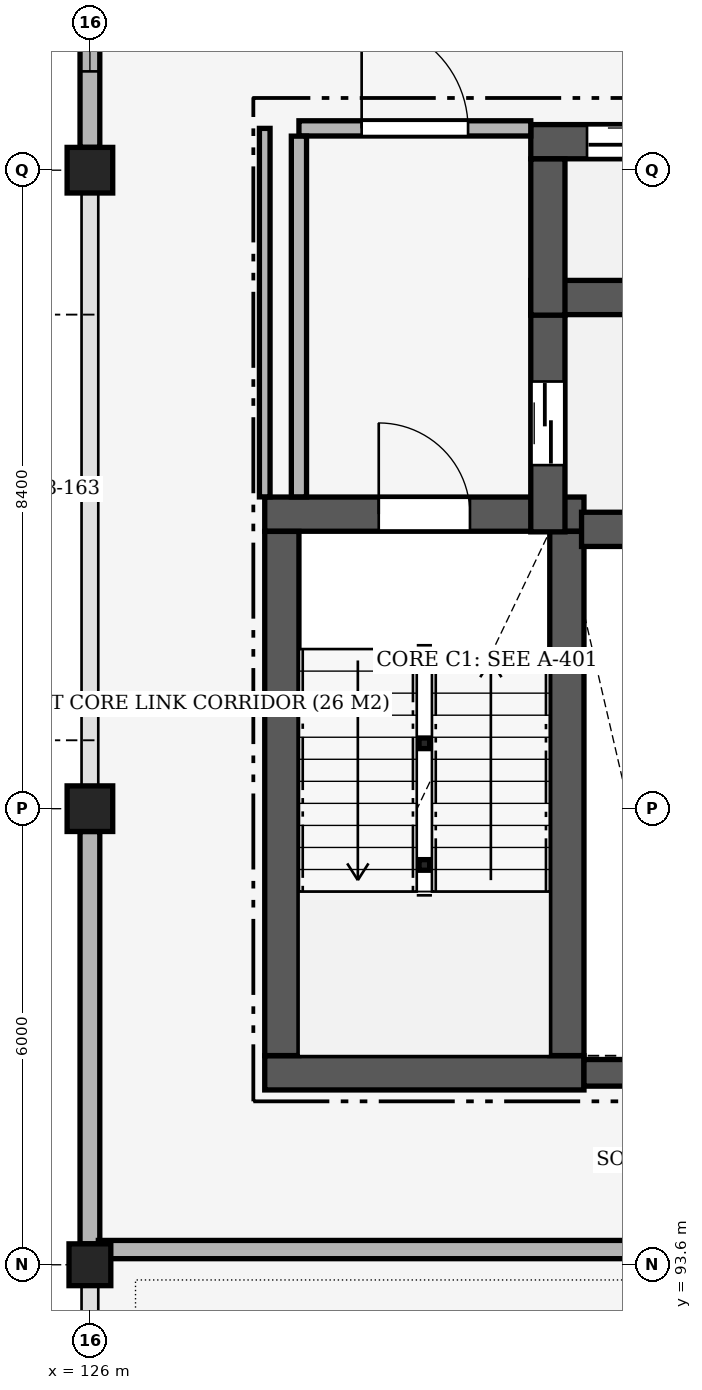
"""IFC4 building model, lengths in metres.
Left out: names, types, materials, properties, quantities, classifications, styles, units other than length and angle.
Written with IfcOpenShell. Run it as: python <this file> out.ifc"""

import sys

from ifc_helpers import new_model, si_unit, direction, frame, frame_2d, origin, origin_2d, place, context, subcontext, project, spatial, rectangle, hollow_circle, extrude, element, fill, save


model = new_model("IFC4")
c1 = context("Model", 3, precision=1e-05, world=origin(), true_north=direction((0.0, 1.0)))
c2 = subcontext(c1, "Body", "Model", "MODEL_VIEW")
j1 = project(units=[si_unit("LENGTHUNIT", "METRE"), si_unit("PLANEANGLEUNIT", "RADIAN")], contexts=[c1])
p1 = place(None, origin())
s1 = spatial("IfcSite", under=j1, at=p1, CompositionType="ELEMENT")
p2 = place(p1, origin())
s2 = spatial("IfcBuilding", under=s1, at=p2, CompositionType="ELEMENT")
p3 = place(p2, frame((0.0, 0.0, 37.8)))
s3 = spatial("IfcBuildingStorey", under=s2, at=p3, CompositionType="ELEMENT", Elevation=37.8)
p4 = place(p3, frame((126.0, 93.6, 0.0), z_axis=(0.0, 0.0, 1.0), x_axis=(1.0, 0.0, 0.0)))
e1 = element("IfcColumn", 1, at=p4, inside=s3, PredefinedType="COLUMN", context=c2, shape_type="SweptSolid", body=[
    extrude(rectangle(XDim=0.55, YDim=0.55, at=origin_2d()), origin(), (0.0, 0.0, 1.0), 4.2),
])
for number, where, z_axis, x_axis in (
    (2, (126.0, 99.6, 0.0), (0.0, 0.0, 1.0), (1.0, 0.0, 0.0)),
    (3, (126.0, 108.0, 0.0), (0.0, 0.0, 1.0), (1.0, 0.0, 0.0)),
):
    element("IfcColumn", number, at=place(p3, frame(where, z_axis=z_axis, x_axis=x_axis)), inside=s3, PredefinedType="COLUMN", context=c2, shape_type="SweptSolid", body=[
        extrude(rectangle(XDim=0.6, YDim=0.6, at=origin_2d()), origin(), (0.0, 0.0, 1.0), 4.2),
    ])
for number, where, z_axis, x_axis in (
    (4, (130.4, 98.86, -2.53), (0.0, 0.0, 1.0), (1.0, 0.0, 0.0)),
    (5, (130.4, 100.46, -2.53), (0.0, 0.0, 1.0), (1.0, 0.0, 0.0)),
):
    element("IfcColumn", number, at=place(p3, frame(where, z_axis=z_axis, x_axis=x_axis)), inside=s3, PredefinedType="COLUMN", context=c2, shape_type="SweptSolid", body=[
        extrude(hollow_circle(Radius=0.07, WallThickness=0.008, at=origin_2d()), origin(), (0.0, 0.0, 1.0), 4.2),
    ])
p5 = place(p3, frame((126.0, 93.875, 0.0), z_axis=(0.0, 0.0, 1.0), x_axis=(0.0, 1.0, 0.0)))
e6 = element("IfcWall", 6, at=p5, inside=s3, PredefinedType="SOLIDWALL", context=c2, shape_type="SweptSolid", body=[
    extrude(rectangle(XDim=5.425, YDim=0.26, at=frame_2d((2.712, 0.0))), origin(), (0.0, 0.0, 1.0), 3.41),
])
p6 = place(p3, frame((126.0, 108.3, 0.0), z_axis=(0.0, 0.0, 1.0), x_axis=(0.0, 1.0, 0.0)))
e7 = element("IfcWall", 7, at=p6, inside=s3, PredefinedType="SOLIDWALL", context=c2, shape_type="SweptSolid", body=[
    extrude(rectangle(XDim=4.8, YDim=0.26, at=frame_2d((2.4, 0.0))), origin(), (0.0, 0.0, 1.0), 3.41),
])
p7 = place(p6, frame((1.0, 0.0, 0.9)))
e8 = element("IfcOpeningElement", 8, at=p7, cuts=e7, PredefinedType="OPENING", context=c2, shape_type="SweptSolid", body=[
    extrude(rectangle(XDim=0.9, YDim=2.2, at=frame_2d((0.45, 1.1))), frame((0.0, 0.145, 0.0), z_axis=(0.0, -1.0, 0.0), x_axis=(1.0, 0.0, 0.0)), (0.0, 0.0, 1.0), 0.29),
])
p8 = place(p6, frame((2.9, 0.0, 0.9)))
e9 = element("IfcOpeningElement", 9, at=p8, cuts=e7, PredefinedType="OPENING", context=c2, shape_type="SweptSolid", body=[
    extrude(rectangle(XDim=0.9, YDim=2.2, at=frame_2d((0.45, 1.1))), frame((0.0, 0.145, 0.0), z_axis=(0.0, -1.0, 0.0), x_axis=(1.0, 0.0, 0.0)), (0.0, 0.0, 1.0), 0.29),
])
p9 = place(p3, frame((128.3, 103.475, 0.0), z_axis=(0.0, 0.0, 1.0), x_axis=(1.0, 0.0, 0.0)))
e10 = element("IfcWall", 10, at=p9, inside=s3, PredefinedType="SHEAR", context=c2, shape_type="SweptSolid", body=[
    extrude(rectangle(XDim=4.2, YDim=0.45, at=frame_2d((2.1, 0.0))), origin(), (0.0, 0.0, 1.0), 3.96),
])
p10 = place(p9, frame((1.5, 0.0, 0.0)))
e11 = element("IfcOpeningElement", 11, at=p10, cuts=e10, PredefinedType="OPENING", context=c2, shape_type="SweptSolid", body=[
    extrude(rectangle(XDim=1.2, YDim=2.2, at=frame_2d((0.6, 1.1))), frame((0.0, 0.24, 0.0), z_axis=(0.0, -1.0, 0.0), x_axis=(1.0, 0.0, 0.0)), (0.0, 0.0, 1.0), 0.48),
])
p11 = place(p3, frame((128.3, 96.125, 0.0), z_axis=(0.0, 0.0, 1.0), x_axis=(1.0, 0.0, 0.0)))
e12 = element("IfcWall", 12, at=p11, inside=s3, PredefinedType="SHEAR", context=c2, shape_type="SweptSolid", body=[
    extrude(rectangle(XDim=4.2, YDim=0.45, at=frame_2d((2.1, 0.0))), origin(), (0.0, 0.0, 1.0), 3.96),
])
for number, where, z_axis, x_axis in (
    (13, (128.525, 96.352, 0.0), (0.0, 0.0, 1.0), (0.0, 1.0, 0.0)),
    (14, (132.275, 96.352, 0.0), (0.0, 0.0, 1.0), (0.0, 1.0, 0.0)),
):
    element("IfcWall", number, at=place(p3, frame(where, z_axis=z_axis, x_axis=x_axis)), inside=s3, PredefinedType="SHEAR", context=c2, shape_type="SweptSolid", body=[
        extrude(rectangle(XDim=6.896, YDim=0.45, at=frame_2d((3.448, 0.0))), origin(), (0.0, 0.0, 1.0), 3.96),
    ])
p12 = place(p3, frame((132.468, 103.275, 0.0), z_axis=(0.0, 0.0, 1.0), x_axis=(1.0, 0.0, 0.0)))
e15 = element("IfcWall", 15, at=p12, inside=s3, PredefinedType="SHEAR", context=c2, shape_type="SweptSolid", body=[
    extrude(rectangle(XDim=1.832, YDim=0.45, at=frame_2d((0.916, 0.0))), origin(), (0.0, 0.0, 1.0), 3.96),
])
p13 = place(p3, frame((131.8, 106.325, 0.0), z_axis=(0.0, 0.0, 1.0), x_axis=(1.0, 0.0, 0.0)))
e16 = element("IfcWall", 16, at=p13, inside=s3, PredefinedType="SHEAR", context=c2, shape_type="SweptSolid", body=[
    extrude(rectangle(XDim=2.5, YDim=0.45, at=frame_2d((1.25, 0.0))), origin(), (0.0, 0.0, 1.0), 3.96),
])
p14 = place(p3, frame((132.025, 103.242, 0.0), z_axis=(0.0, 0.0, 1.0), x_axis=(0.0, 1.0, 0.0)))
e17 = element("IfcWall", 17, at=p14, inside=s3, PredefinedType="SHEAR", context=c2, shape_type="SweptSolid", body=[
    extrude(rectangle(XDim=2.856, YDim=0.45, at=frame_2d((1.428, 0.0))), origin(), (0.0, 0.0, 1.0), 3.96),
])
p15 = place(p14, frame((0.878, 0.0, 0.0)))
e18 = element("IfcOpeningElement", 18, at=p15, cuts=e17, PredefinedType="OPENING", context=c2, shape_type="SweptSolid", body=[
    extrude(rectangle(XDim=1.1, YDim=2.15, at=frame_2d((0.55, 1.075))), frame((0.0, 0.24, 0.0), z_axis=(0.0, -1.0, 0.0), x_axis=(1.0, 0.0, 0.0)), (0.0, 0.0, 1.0), 0.48),
])
p16 = place(p3, frame((131.8, 108.375, 0.0), z_axis=(0.0, 0.0, 1.0), x_axis=(1.0, 0.0, 0.0)))
e19 = element("IfcWall", 19, at=p16, inside=s3, PredefinedType="SHEAR", context=c2, shape_type="SweptSolid", body=[
    extrude(rectangle(XDim=2.58, YDim=0.45, at=frame_2d((1.29, 0.0))), origin(), (0.0, 0.0, 1.0), 3.96),
])
p17 = place(p16, frame((0.74, 0.0, 0.0)))
e20 = element("IfcOpeningElement", 20, at=p17, cuts=e19, PredefinedType="OPENING", context=c2, shape_type="SweptSolid", body=[
    extrude(rectangle(XDim=1.1, YDim=2.15, at=frame_2d((0.55, 1.075))), frame((0.0, 0.24, 0.0), z_axis=(0.0, -1.0, 0.0), x_axis=(1.0, 0.0, 0.0)), (0.0, 0.0, 1.0), 0.48),
])
p18 = place(p3, frame((132.025, 106.093, 0.0), z_axis=(0.0, 0.0, 1.0), x_axis=(0.0, 1.0, 0.0)))
e21 = element("IfcWall", 21, at=p18, inside=s3, PredefinedType="SHEAR", context=c2, shape_type="SweptSolid", body=[
    extrude(rectangle(XDim=2.055, YDim=0.45, at=frame_2d((1.027, 0.0))), origin(), (0.0, 0.0, 1.0), 3.96),
])
p19 = place(p3, frame((132.5, 96.125, 0.0), z_axis=(0.0, 0.0, 1.0), x_axis=(1.0, 0.0, 0.0)))
e22 = element("IfcWall", 22, at=p19, inside=s3, PredefinedType="SHEAR", context=c2, shape_type="SweptSolid", body=[
    extrude(rectangle(XDim=1.8, YDim=0.35, at=frame_2d((0.9, 0.0))), origin(), (0.0, 0.0, 1.0), 3.96),
])
p20 = place(p3, frame((126.111, 93.8, 0.0), z_axis=(0.0, 0.0, 1.0), x_axis=(1.0, 0.0, 0.0)))
e23 = element("IfcWall", 23, at=p20, inside=s3, PredefinedType="PARTITIONING", context=c2, shape_type="SweptSolid", body=[
    extrude(rectangle(XDim=14.089, YDim=0.24, at=frame_2d((7.044, 0.0))), origin(), (0.0, 0.0, 1.0), 3.26),
])
p21 = place(p3, frame((128.75, 108.55, 0.0), z_axis=(0.0, 0.0, 1.0), x_axis=(1.0, 0.0, 0.0)))
e24 = element("IfcWall", 24, at=p21, inside=s3, PredefinedType="PARTITIONING", context=c2, shape_type="SweptSolid", body=[
    extrude(rectangle(XDim=3.05, YDim=0.2, at=frame_2d((1.525, 0.0))), origin(), (0.0, 0.0, 1.0), 3.96),
])
p22 = place(p21, frame((0.825, 0.0, 0.0)))
e25 = element("IfcOpeningElement", 25, at=p22, cuts=e24, PredefinedType="OPENING", context=c2, shape_type="SweptSolid", body=[
    extrude(rectangle(XDim=1.4, YDim=2.2, at=frame_2d((0.7, 1.1))), frame((0.0, 0.115, 0.0), z_axis=(0.0, -1.0, 0.0), x_axis=(1.0, 0.0, 0.0)), (0.0, 0.0, 1.0), 0.23),
])
p23 = place(p3, frame((128.3, 103.702, 0.0), z_axis=(0.0, 0.0, 1.0), x_axis=(0.0, 1.0, 0.0)))
e26 = element("IfcWall", 26, at=p23, inside=s3, PredefinedType="PARTITIONING", context=c2, shape_type="SweptSolid", body=[
    extrude(rectangle(XDim=4.848, YDim=0.14, at=frame_2d((2.424, 0.0))), origin(), (0.0, 0.0, 1.0), 3.96),
])
p24 = place(p3, frame((128.75, 103.702, 0.0), z_axis=(0.0, 0.0, 1.0), x_axis=(0.0, 1.0, 0.0)))
e27 = element("IfcWall", 27, at=p24, inside=s3, PredefinedType="PARTITIONING", context=c2, shape_type="SweptSolid", body=[
    extrude(rectangle(XDim=4.746, YDim=0.2, at=frame_2d((2.373, 0.0))), origin(), (0.0, 0.0, 1.0), 3.96),
])
p25 = place(p7, origin())
e28 = element("IfcWindow", 28, at=p25, inside=s3, PartitioningType="SINGLE_PANEL", PredefinedType="WINDOW", context=c2, shape_type="SweptSolid", body=[
    extrude(rectangle(XDim=0.9, YDim=2.2, at=frame_2d((0.45, 1.1))), frame((0.0, 0.03, 0.0), z_axis=(0.0, -1.0, 0.0), x_axis=(1.0, 0.0, 0.0)), (0.0, 0.0, 1.0), 0.06),
])
fill(e8, e28)
p26 = place(p10, origin())
e29 = element("IfcDoor", 29, at=p26, inside=s3, OperationType="SINGLE_SWING_LEFT", PredefinedType="DOOR", context=c2, shape_type="SweptSolid", body=[
    extrude(rectangle(XDim=1.2, YDim=2.2, at=frame_2d((0.6, 1.1))), frame((0.0, 0.025, 0.0), z_axis=(0.0, -1.0, 0.0), x_axis=(1.0, 0.0, 0.0)), (0.0, 0.0, 1.0), 0.05),
])
fill(e11, e29)
p27 = place(p15, origin())
e30 = element("IfcDoor", 30, at=p27, inside=s3, OperationType="DOUBLE_DOOR_SLIDING", PredefinedType="DOOR", context=c2, shape_type="SweptSolid", body=[
    extrude(rectangle(XDim=1.1, YDim=2.15, at=frame_2d((0.55, 1.075))), frame((0.0, 0.025, 0.0), z_axis=(0.0, -1.0, 0.0), x_axis=(1.0, 0.0, 0.0)), (0.0, 0.0, 1.0), 0.05),
])
fill(e18, e30)
p28 = place(p17, origin())
e31 = element("IfcDoor", 31, at=p28, inside=s3, OperationType="DOUBLE_DOOR_SLIDING", PredefinedType="DOOR", context=c2, shape_type="SweptSolid", body=[
    extrude(rectangle(XDim=1.1, YDim=2.15, at=frame_2d((0.55, 1.075))), frame((0.0, 0.025, 0.0), z_axis=(0.0, -1.0, 0.0), x_axis=(1.0, 0.0, 0.0)), (0.0, 0.0, 1.0), 0.05),
])
fill(e20, e31)
p29 = place(p22, origin())
e32 = element("IfcDoor", 32, at=p29, inside=s3, OperationType="SINGLE_SWING_LEFT", PredefinedType="DOOR", context=c2, shape_type="SweptSolid", body=[
    extrude(rectangle(XDim=1.4, YDim=2.2, at=frame_2d((0.7, 1.1))), frame((0.0, 0.025, 0.0), z_axis=(0.0, -1.0, 0.0), x_axis=(1.0, 0.0, 0.0)), (0.0, 0.0, 1.0), 0.05),
])
fill(e25, e32)
save(model, sys.argv[1])
